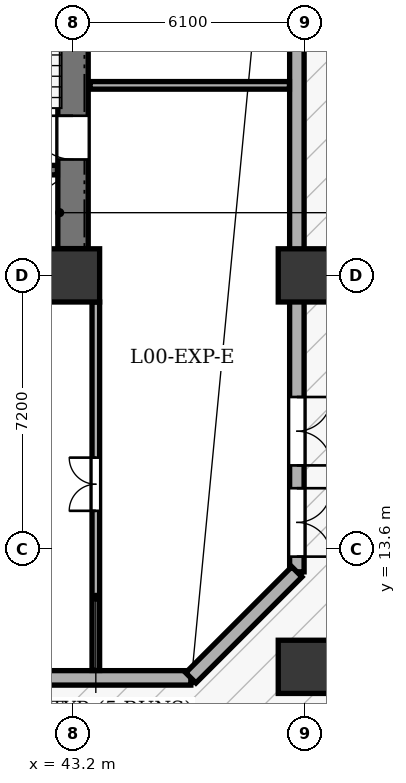
"""IFC4 building model, lengths in metres.
Left out: names, types, materials, properties, quantities, classifications, styles, units other than length and angle.
Written with IfcOpenShell. Run it as: python <this file> out.ifc"""

import sys

from ifc_helpers import new_model, si_unit, direction, frame, frame_2d, origin, origin_2d, place, context, subcontext, project, spatial, rectangle, extrude, element, fill, save


model = new_model("IFC4")
c1 = context("Model", 3, precision=1e-05, world=origin(), true_north=direction((0.0, 1.0)))
c2 = subcontext(c1, "Body", "Model", "MODEL_VIEW")
j1 = project(units=[si_unit("LENGTHUNIT", "METRE"), si_unit("PLANEANGLEUNIT", "RADIAN")], contexts=[c1])
p1 = place(None, origin())
s1 = spatial("IfcSite", under=j1, at=p1, CompositionType="ELEMENT")
p2 = place(p1, origin())
s2 = spatial("IfcBuilding", under=s1, at=p2, CompositionType="ELEMENT")
p3 = place(p2, origin())
s3 = spatial("IfcBuildingStorey", under=s2, at=p3, CompositionType="ELEMENT", Elevation=0.0)
for number, where, z_axis, x_axis in (
    (1, (43.2, 20.8, 0.0), (0.0, 0.0, 1.0), (1.0, 0.0, 0.0)),
    (2, (49.3, 10.5, 0.0), (0.0, 0.0, 1.0), (1.0, 0.0, 0.0)),
    (3, (49.3, 20.8, 0.0), (0.0, 0.0, 1.0), (1.0, 0.0, 0.0)),
):
    element("IfcColumn", number, at=place(p3, frame(where, z_axis=z_axis, x_axis=x_axis)), inside=s3, PredefinedType="COLUMN", context=c2, shape_type="SweptSolid", body=[
        extrude(rectangle(XDim=1.4, YDim=1.4, at=origin_2d()), origin(), (0.0, 0.0, 1.0), 5.4),
    ])
p4 = place(p3, frame((46.3, 10.21, 0.0), z_axis=(0.0, 0.0, 1.0), x_axis=(-1.0, 0.0, 0.0)))
e4 = element("IfcWall", 4, at=p4, inside=s3, PredefinedType="STANDARD", context=c2, shape_type="SweptSolid", body=[
    extrude(rectangle(XDim=34.1, YDim=0.38, at=frame_2d((17.05, 0.0))), origin(), (0.0, 0.0, 1.0), 3.135),
])
p5 = place(p4, frame((13.8, 0.0, 0.0)))
e5 = element("IfcOpeningElement", 5, at=p5, cuts=e4, PredefinedType="OPENING", context=c2, shape_type="SweptSolid", body=[
    extrude(rectangle(XDim=2.0, YDim=2.3, at=frame_2d((1.0, 1.15))), frame((0.0, 0.2, 0.0), z_axis=(0.0, -1.0, 0.0), x_axis=(1.0, 0.0, 0.0)), (0.0, 0.0, 1.0), 0.4),
])
p6 = place(p4, frame((20.6, 0.0, 0.0)))
e6 = element("IfcOpeningElement", 6, at=p6, cuts=e4, PredefinedType="OPENING", context=c2, shape_type="SweptSolid", body=[
    extrude(rectangle(XDim=1.8, YDim=2.3, at=frame_2d((0.9, 1.15))), frame((0.0, 0.2, 0.0), z_axis=(0.0, -1.0, 0.0), x_axis=(1.0, 0.0, 0.0)), (0.0, 0.0, 1.0), 0.4),
])
p7 = place(p4, frame((22.8, 0.0, 0.0)))
e7 = element("IfcOpeningElement", 7, at=p7, cuts=e4, PredefinedType="OPENING", context=c2, shape_type="SweptSolid", body=[
    extrude(rectangle(XDim=2.0, YDim=2.3, at=frame_2d((1.0, 1.15))), frame((0.0, 0.2, 0.0), z_axis=(0.0, -1.0, 0.0), x_axis=(1.0, 0.0, 0.0)), (0.0, 0.0, 1.0), 0.4),
])
p8 = place(p4, frame((28.8, 0.0, 0.0)))
e8 = element("IfcOpeningElement", 8, at=p8, cuts=e4, PredefinedType="OPENING", context=c2, shape_type="SweptSolid", body=[
    extrude(rectangle(XDim=2.0, YDim=2.3, at=frame_2d((1.0, 1.15))), frame((0.0, 0.2, 0.0), z_axis=(0.0, -1.0, 0.0), x_axis=(1.0, 0.0, 0.0)), (0.0, 0.0, 1.0), 0.4),
])
p9 = place(p3, frame((49.09, 41.4, 0.0), z_axis=(0.0, 0.0, 1.0), x_axis=(0.0, -1.0, 0.0)))
e9 = element("IfcWall", 9, at=p9, inside=s3, PredefinedType="STANDARD", context=c2, shape_type="SweptSolid", body=[
    extrude(rectangle(XDim=28.4, YDim=0.38, at=frame_2d((14.2, 0.0))), origin(), (0.0, 0.0, 1.0), 3.135),
])
p10 = place(p9, frame((23.8, 0.0, 0.0)))
e10 = element("IfcOpeningElement", 10, at=p10, cuts=e9, PredefinedType="OPENING", context=c2, shape_type="SweptSolid", body=[
    extrude(rectangle(XDim=1.8, YDim=2.3, at=frame_2d((0.9, 1.15))), frame((0.0, 0.2, 0.0), z_axis=(0.0, -1.0, 0.0), x_axis=(1.0, 0.0, 0.0)), (0.0, 0.0, 1.0), 0.4),
])
p11 = place(p9, frame((26.2, 0.0, 0.0)))
e11 = element("IfcOpeningElement", 11, at=p11, cuts=e9, PredefinedType="OPENING", context=c2, shape_type="SweptSolid", body=[
    extrude(rectangle(XDim=1.8, YDim=2.3, at=frame_2d((0.9, 1.15))), frame((0.0, 0.2, 0.0), z_axis=(0.0, -1.0, 0.0), x_axis=(1.0, 0.0, 0.0)), (0.0, 0.0, 1.0), 0.4),
])
p12 = place(p9, frame((1.8, 0.0, 0.0)))
e12 = element("IfcOpeningElement", 12, at=p12, cuts=e9, PredefinedType="OPENING", context=c2, shape_type="SweptSolid", body=[
    extrude(rectangle(XDim=3.2, YDim=2.85, at=frame_2d((1.6, 1.425))), frame((0.0, 0.2, 0.0), z_axis=(0.0, -1.0, 0.0), x_axis=(1.0, 0.0, 0.0)), (0.0, 0.0, 1.0), 0.4),
])
p13 = place(p3, frame((49.09, 13.0, 0.0), z_axis=(0.0, 0.0, 1.0), x_axis=(-0.707106781187, -0.707106781187, 0.0)))
e13 = element("IfcWall", 13, at=p13, inside=s3, PredefinedType="STANDARD", context=c2, shape_type="SweptSolid", body=[
    extrude(rectangle(XDim=3.946, YDim=0.38, at=frame_2d((1.973, 0.0))), origin(), (0.0, 0.0, 1.0), 4.95),
])
p14 = place(p3, frame((43.2, 21.505, 0.0), z_axis=(0.0, 0.0, 1.0), x_axis=(0.0, 1.0, 0.0)))
e14 = element("IfcWall", 14, at=p14, inside=s3, PredefinedType="SHEAR", context=c2, shape_type="SweptSolid", body=[
    extrude(rectangle(XDim=11.39, YDim=0.8, at=frame_2d((5.695, 0.0))), origin(), (0.0, 0.0, 1.0), 4.95),
])
p15 = place(p14, frame((2.345, 0.0, 0.0)))
e15 = element("IfcOpeningElement", 15, at=p15, cuts=e14, PredefinedType="OPENING", context=c2, shape_type="SweptSolid", body=[
    extrude(rectangle(XDim=1.15, YDim=2.15, at=frame_2d((0.575, 1.075))), frame((0.0, 0.41, 0.0), z_axis=(0.0, -1.0, 0.0), x_axis=(1.0, 0.0, 0.0)), (0.0, 0.0, 1.0), 0.82),
])
p16 = place(p3, frame((39.69, 23.57, 0.0), z_axis=(0.0, 0.0, 1.0), x_axis=(1.0, 0.0, 0.0)))
e16 = element("IfcWall", 16, at=p16, inside=s3, PredefinedType="SHEAR", context=c2, shape_type="SweptSolid", body=[
    extrude(rectangle(XDim=3.1, YDim=0.25, at=frame_2d((1.55, 0.0))), origin(), (0.0, 0.0, 1.0), 4.95),
])
p17 = place(p3, frame((43.8, 10.405, 0.0), z_axis=(0.0, 0.0, 1.0), x_axis=(0.0, 1.0, 0.0)))
e17 = element("IfcWall", 17, at=p17, inside=s3, PredefinedType="SOLIDWALL", context=c2, shape_type="SweptSolid", body=[
    extrude(rectangle(XDim=9.695, YDim=0.2, at=frame_2d((4.848, 0.0))), origin(), (0.0, 0.0, 1.0), 3.135),
])
p18 = place(p17, frame((4.2, 0.0, 0.0)))
e18 = element("IfcOpeningElement", 18, at=p18, cuts=e17, PredefinedType="OPENING", context=c2, shape_type="SweptSolid", body=[
    extrude(rectangle(XDim=1.4, YDim=2.15, at=frame_2d((0.7, 1.075))), frame((0.0, 0.11, 0.0), z_axis=(0.0, -1.0, 0.0), x_axis=(1.0, 0.0, 0.0)), (0.0, 0.0, 1.0), 0.22),
])
p19 = place(p3, frame((43.65, 25.8, 0.0), z_axis=(0.0, 0.0, 1.0), x_axis=(1.0, 0.0, 0.0)))
e19 = element("IfcWall", 19, at=p19, inside=s3, PredefinedType="SOLIDWALL", context=c2, shape_type="SweptSolid", body=[
    extrude(rectangle(XDim=5.245, YDim=0.2, at=frame_2d((2.623, 0.0))), origin(), (0.0, 0.0, 1.0), 4.95),
])
p20 = place(p10, origin())
e20 = element("IfcDoor", 20, at=p20, inside=s3, OperationType="DOUBLE_DOOR_SINGLE_SWING", PredefinedType="DOOR", context=c2, shape_type="SweptSolid", body=[
    extrude(rectangle(XDim=1.8, YDim=2.3, at=frame_2d((0.9, 1.15))), frame((0.0, 0.025, 0.0), z_axis=(0.0, -1.0, 0.0), x_axis=(1.0, 0.0, 0.0)), (0.0, 0.0, 1.0), 0.05),
])
fill(e10, e20)
p21 = place(p11, origin())
e21 = element("IfcDoor", 21, at=p21, inside=s3, OperationType="DOUBLE_DOOR_SINGLE_SWING", PredefinedType="DOOR", context=c2, shape_type="SweptSolid", body=[
    extrude(rectangle(XDim=1.8, YDim=2.3, at=frame_2d((0.9, 1.15))), frame((0.0, 0.025, 0.0), z_axis=(0.0, -1.0, 0.0), x_axis=(1.0, 0.0, 0.0)), (0.0, 0.0, 1.0), 0.05),
])
fill(e11, e21)
p22 = place(p15, origin())
e22 = element("IfcDoor", 22, at=p22, inside=s3, OperationType="SINGLE_SWING_RIGHT", PredefinedType="DOOR", context=c2, shape_type="SweptSolid", body=[
    extrude(rectangle(XDim=1.15, YDim=2.15, at=frame_2d((0.575, 1.075))), frame((0.0, 0.025, 0.0), z_axis=(0.0, -1.0, 0.0), x_axis=(1.0, 0.0, 0.0)), (0.0, 0.0, 1.0), 0.05),
])
fill(e15, e22)
p23 = place(p18, origin())
e23 = element("IfcDoor", 23, at=p23, inside=s3, OperationType="DOUBLE_DOOR_SINGLE_SWING", PredefinedType="DOOR", context=c2, shape_type="SweptSolid", body=[
    extrude(rectangle(XDim=1.4, YDim=2.15, at=frame_2d((0.7, 1.075))), frame((0.0, 0.025, 0.0), z_axis=(0.0, -1.0, 0.0), x_axis=(1.0, 0.0, 0.0)), (0.0, 0.0, 1.0), 0.05),
])
fill(e18, e23)
save(model, sys.argv[1])
